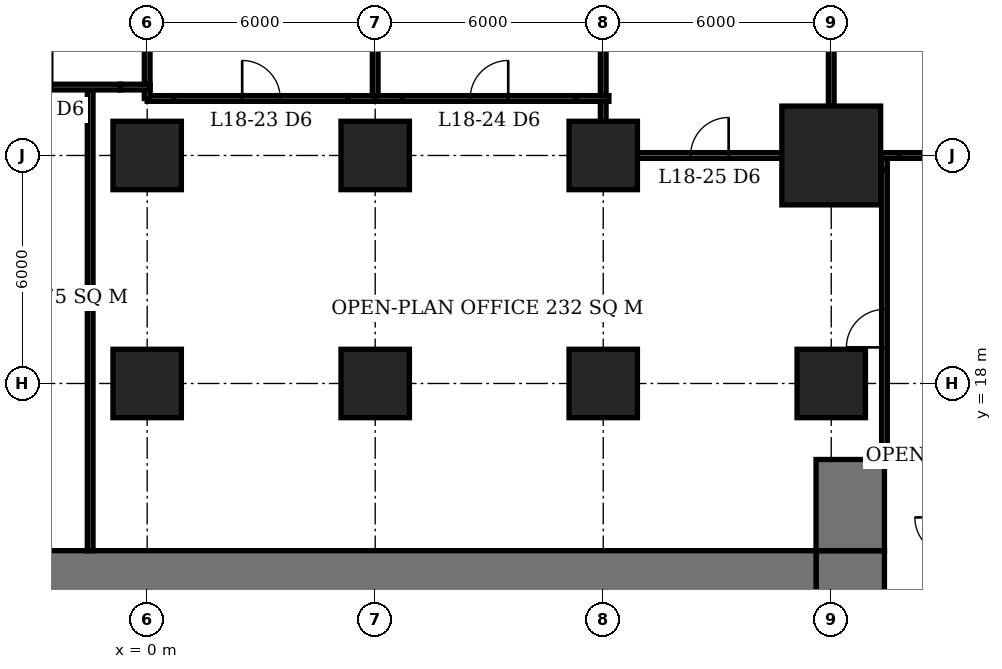
"""IFC4 building model, lengths in metres.
Left out: names, types, materials, properties, quantities, classifications, styles, units other than length and angle.
Written with IfcOpenShell. Run it as: python <this file> out.ifc"""

import sys

from ifc_helpers import new_model, si_unit, direction, frame, frame_2d, origin, origin_2d, place, context, subcontext, project, spatial, rectangle, extrude, element, fill, save


model = new_model("IFC4")
c1 = context("Model", 3, precision=1e-05, world=origin(), true_north=direction((0.0, 1.0)))
c2 = subcontext(c1, "Body", "Model", "MODEL_VIEW")
j1 = project(units=[si_unit("LENGTHUNIT", "METRE"), si_unit("PLANEANGLEUNIT", "RADIAN")], contexts=[c1])
p1 = place(None, origin())
s1 = spatial("IfcSite", under=j1, at=p1, CompositionType="ELEMENT")
p2 = place(p1, origin())
s2 = spatial("IfcBuilding", under=s1, at=p2, CompositionType="ELEMENT")
p3 = place(p2, frame((0.0, 0.0, 76.7)))
s3 = spatial("IfcBuildingStorey", under=s2, at=p3, CompositionType="ELEMENT", Elevation=76.7)
for number, where, z_axis, x_axis in (
    (1, (0.0, 18.0, 0.0), (0.0, 0.0, 1.0), (1.0, 0.0, 0.0)),
    (2, (0.0, 24.0, 0.0), (0.0, 0.0, 1.0), (1.0, 0.0, 0.0)),
    (3, (6.0, 18.0, 0.0), (0.0, 0.0, 1.0), (1.0, 0.0, 0.0)),
    (4, (6.0, 24.0, 0.0), (0.0, 0.0, 1.0), (1.0, 0.0, 0.0)),
    (5, (12.0, 18.0, 0.0), (0.0, 0.0, 1.0), (1.0, 0.0, 0.0)),
    (6, (12.0, 24.0, 0.0), (0.0, 0.0, 1.0), (1.0, 0.0, 0.0)),
    (7, (18.0, 18.0, 0.0), (0.0, 0.0, 1.0), (1.0, 0.0, 0.0)),
):
    element("IfcColumn", number, at=place(p3, frame(where, z_axis=z_axis, x_axis=x_axis)), inside=s3, PredefinedType="COLUMN", context=c2, shape_type="SweptSolid", body=[
        extrude(rectangle(XDim=1.8, YDim=1.8, at=origin_2d()), origin(), (0.0, 0.0, 1.0), 3.9),
    ])
p4 = place(p3, frame((18.0, 24.0, 0.0), z_axis=(0.0, 0.0, 1.0), x_axis=(1.0, 0.0, 0.0)))
e8 = element("IfcColumn", 8, at=p4, inside=s3, PredefinedType="COLUMN", context=c2, shape_type="SweptSolid", body=[
    extrude(rectangle(XDim=2.6, YDim=2.6, at=origin_2d()), origin(), (0.0, 0.0, 1.0), 3.9),
])
p5 = place(p3, frame((-5.6, 12.6, 0.0), z_axis=(0.0, 0.0, 1.0), x_axis=(1.0, 0.0, 0.0)))
e9 = element("IfcWall", 9, at=p5, inside=s3, PredefinedType="SHEAR", context=c2, shape_type="SweptSolid", body=[
    extrude(rectangle(XDim=23.2, YDim=2.0, at=frame_2d((11.6, 0.0))), origin(), (0.0, 0.0, 1.0), 3.9),
])
p6 = place(p3, frame((18.5, -7.6, 0.0), z_axis=(0.0, 0.0, 1.0), x_axis=(0.0, 1.0, 0.0)))
e10 = element("IfcWall", 10, at=p6, inside=s3, PredefinedType="SHEAR", context=c2, shape_type="SweptSolid", body=[
    extrude(rectangle(XDim=21.2, YDim=1.8, at=frame_2d((10.6, 0.0))), origin(), (0.0, 0.0, 1.0), 3.9),
])
p7 = place(p6, frame((9.2, 0.0, 0.0)))
e11 = element("IfcOpeningElement", 11, at=p7, cuts=e10, PredefinedType="OPENING", context=c2, shape_type="SweptSolid", body=[
    extrude(rectangle(XDim=1.8, YDim=2.4, at=frame_2d((0.9, 1.2))), frame((0.0, 0.91, 0.0), z_axis=(0.0, -1.0, 0.0), x_axis=(1.0, 0.0, 0.0)), (0.0, 0.0, 1.0), 1.82),
])
p8 = place(p3, frame((18.5, 13.6, 0.0), z_axis=(0.0, 0.0, 1.0), x_axis=(0.0, 1.0, 0.0)))
e12 = element("IfcWall", 12, at=p8, inside=s3, PredefinedType="SHEAR", context=c2, shape_type="SweptSolid", body=[
    extrude(rectangle(XDim=2.4, YDim=1.8, at=frame_2d((1.2, 0.0))), origin(), (0.0, 0.0, 1.0), 3.9),
])
p9 = place(p3, frame((12.9, 24.0, 0.0), z_axis=(0.0, 0.0, 1.0), x_axis=(1.0, 0.0, 0.0)))
e13 = element("IfcWall", 13, at=p9, inside=s3, PredefinedType="PARTITIONING", context=c2, shape_type="SweptSolid", body=[
    extrude(rectangle(XDim=3.8, YDim=0.15, at=frame_2d((1.9, 0.0))), origin(), (0.0, 0.0, 1.0), 3.65),
])
p10 = place(p9, frame((1.4, 0.0, 0.0)))
e14 = element("IfcOpeningElement", 14, at=p10, cuts=e13, PredefinedType="OPENING", context=c2, shape_type="SweptSolid", body=[
    extrude(rectangle(XDim=1.0, YDim=2.1, at=frame_2d((0.5, 1.05))), frame((0.0, 0.085, 0.0), z_axis=(0.0, -1.0, 0.0), x_axis=(1.0, 0.0, 0.0)), (0.0, 0.0, 1.0), 0.17),
])
p11 = place(p3, frame((19.3, 24.0, 0.0), z_axis=(0.0, 0.0, 1.0), x_axis=(1.0, 0.0, 0.0)))
e15 = element("IfcWall", 15, at=p11, inside=s3, PredefinedType="PARTITIONING", context=c2, shape_type="SweptSolid", body=[
    extrude(rectangle(XDim=0.492, YDim=0.15, at=frame_2d((0.246, 0.0))), origin(), (0.0, 0.0, 1.0), 2.65),
])
p12 = place(p3, frame((19.792, 24.0, 0.0), z_axis=(0.0, 0.0, 1.0), x_axis=(1.0, 0.0, 0.0)))
e16 = element("IfcWall", 16, at=p12, inside=s3, PredefinedType="PARTITIONING", context=c2, shape_type="SweptSolid", body=[
    extrude(rectangle(XDim=4.133, YDim=0.15, at=frame_2d((2.066, 0.0))), origin(), (0.0, 0.0, 1.0), 3.65),
])
p13 = place(p12, frame((1.604, 0.0, 0.0)))
e17 = element("IfcOpeningElement", 17, at=p13, cuts=e16, PredefinedType="OPENING", context=c2, shape_type="SweptSolid", body=[
    extrude(rectangle(XDim=1.0, YDim=2.1, at=frame_2d((0.5, 1.05))), frame((0.0, 0.085, 0.0), z_axis=(0.0, -1.0, 0.0), x_axis=(1.0, 0.0, 0.0)), (0.0, 0.0, 1.0), 0.17),
])
p14 = place(p3, frame((0.0, 25.5, 0.0), z_axis=(0.0, 0.0, 1.0), x_axis=(1.0, 0.0, 0.0)))
e18 = element("IfcWall", 18, at=p14, inside=s3, PredefinedType="PARTITIONING", context=c2, shape_type="SweptSolid", body=[
    extrude(rectangle(XDim=0.71, YDim=0.15, at=frame_2d((0.355, 0.0))), origin(), (0.0, 0.0, 1.0), 2.65),
])
p15 = place(p3, frame((0.71, 25.5, 0.0), z_axis=(0.0, 0.0, 1.0), x_axis=(1.0, 0.0, 0.0)))
e19 = element("IfcWall", 19, at=p15, inside=s3, PredefinedType="PARTITIONING", context=c2, shape_type="SweptSolid", body=[
    extrude(rectangle(XDim=4.58, YDim=0.15, at=frame_2d((2.29, 0.0))), origin(), (0.0, 0.0, 1.0), 3.65),
])
p16 = place(p15, frame((1.79, 0.0, 0.0)))
e20 = element("IfcOpeningElement", 20, at=p16, cuts=e19, PredefinedType="OPENING", context=c2, shape_type="SweptSolid", body=[
    extrude(rectangle(XDim=1.0, YDim=2.1, at=frame_2d((0.5, 1.05))), frame((0.0, 0.085, 0.0), z_axis=(0.0, -1.0, 0.0), x_axis=(1.0, 0.0, 0.0)), (0.0, 0.0, 1.0), 0.17),
])
p17 = place(p3, frame((5.29, 25.5, 0.0), z_axis=(0.0, 0.0, 1.0), x_axis=(1.0, 0.0, 0.0)))
e21 = element("IfcWall", 21, at=p17, inside=s3, PredefinedType="PARTITIONING", context=c2, shape_type="SweptSolid", body=[
    extrude(rectangle(XDim=0.785, YDim=0.15, at=frame_2d((0.393, 0.0))), origin(), (0.0, 0.0, 1.0), 2.65),
])
p18 = place(p3, frame((6.0, 25.5, 0.0), z_axis=(0.0, 0.0, 1.0), x_axis=(1.0, 0.0, 0.0)))
e22 = element("IfcWall", 22, at=p18, inside=s3, PredefinedType="PARTITIONING", context=c2, shape_type="SweptSolid", body=[
    extrude(rectangle(XDim=0.71, YDim=0.15, at=frame_2d((0.355, 0.0))), origin(), (0.0, 0.0, 1.0), 2.65),
])
p19 = place(p3, frame((6.71, 25.5, 0.0), z_axis=(0.0, 0.0, 1.0), x_axis=(1.0, 0.0, 0.0)))
e23 = element("IfcWall", 23, at=p19, inside=s3, PredefinedType="PARTITIONING", context=c2, shape_type="SweptSolid", body=[
    extrude(rectangle(XDim=4.58, YDim=0.15, at=frame_2d((2.29, 0.0))), origin(), (0.0, 0.0, 1.0), 3.65),
])
p20 = place(p19, frame((1.79, 0.0, 0.0)))
e24 = element("IfcOpeningElement", 24, at=p20, cuts=e23, PredefinedType="OPENING", context=c2, shape_type="SweptSolid", body=[
    extrude(rectangle(XDim=1.0, YDim=2.1, at=frame_2d((0.5, 1.05))), frame((0.0, 0.085, 0.0), z_axis=(0.0, -1.0, 0.0), x_axis=(1.0, 0.0, 0.0)), (0.0, 0.0, 1.0), 0.17),
])
p21 = place(p3, frame((11.29, 25.5, 0.0), z_axis=(0.0, 0.0, 1.0), x_axis=(1.0, 0.0, 0.0)))
e25 = element("IfcWall", 25, at=p21, inside=s3, PredefinedType="PARTITIONING", context=c2, shape_type="SweptSolid", body=[
    extrude(rectangle(XDim=0.86, YDim=0.15, at=frame_2d((0.43, 0.0))), origin(), (0.0, 0.0, 1.0), 2.65),
])
p22 = place(p3, frame((-5.29, 25.8, 0.0), z_axis=(0.0, 0.0, 1.0), x_axis=(1.0, 0.0, 0.0)))
e26 = element("IfcWall", 26, at=p22, inside=s3, PredefinedType="PARTITIONING", context=c2, shape_type="SweptSolid", body=[
    extrude(rectangle(XDim=4.58, YDim=0.15, at=frame_2d((2.29, 0.0))), origin(), (0.0, 0.0, 1.0), 3.65),
])
p23 = place(p22, frame((1.79, 0.0, 0.0)))
e27 = element("IfcOpeningElement", 27, at=p23, cuts=e26, PredefinedType="OPENING", context=c2, shape_type="SweptSolid", body=[
    extrude(rectangle(XDim=1.0, YDim=2.1, at=frame_2d((0.5, 1.05))), frame((0.0, 0.085, 0.0), z_axis=(0.0, -1.0, 0.0), x_axis=(1.0, 0.0, 0.0)), (0.0, 0.0, 1.0), 0.17),
])
p24 = place(p3, frame((-0.71, 25.8, 0.0), z_axis=(0.0, 0.0, 1.0), x_axis=(1.0, 0.0, 0.0)))
e28 = element("IfcWall", 28, at=p24, inside=s3, PredefinedType="PARTITIONING", context=c2, shape_type="SweptSolid", body=[
    extrude(rectangle(XDim=0.785, YDim=0.15, at=frame_2d((0.393, 0.0))), origin(), (0.0, 0.0, 1.0), 2.65),
])
p25 = place(p3, frame((0.0, 25.5, 0.0), z_axis=(0.0, 0.0, 1.0), x_axis=(0.0, 1.0, 0.0)))
e29 = element("IfcWall", 29, at=p25, inside=s3, PredefinedType="PARTITIONING", context=c2, shape_type="SweptSolid", body=[
    extrude(rectangle(XDim=0.3, YDim=0.15, at=frame_2d((0.15, 0.0))), origin(), (0.0, 0.0, 1.0), 2.65),
])
p26 = place(p3, frame((0.0, 25.875, 0.0), z_axis=(0.0, 0.0, 1.0), x_axis=(0.0, 1.0, 0.0)))
e30 = element("IfcWall", 30, at=p26, inside=s3, PredefinedType="PARTITIONING", context=c2, shape_type="SweptSolid", body=[
    extrude(rectangle(XDim=2.435, YDim=0.15, at=frame_2d((1.218, 0.0))), origin(), (0.0, 0.0, 1.0), 2.65),
])
p27 = place(p3, frame((6.0, 25.575, 0.0), z_axis=(0.0, 0.0, 1.0), x_axis=(0.0, 1.0, 0.0)))
e31 = element("IfcWall", 31, at=p27, inside=s3, PredefinedType="PARTITIONING", context=c2, shape_type="SweptSolid", body=[
    extrude(rectangle(XDim=2.735, YDim=0.15, at=frame_2d((1.368, 0.0))), origin(), (0.0, 0.0, 1.0), 2.65),
])
p28 = place(p3, frame((12.0, 24.9, 0.0), z_axis=(0.0, 0.0, 1.0), x_axis=(0.0, 1.0, 0.0)))
e32 = element("IfcWall", 32, at=p28, inside=s3, PredefinedType="PARTITIONING", context=c2, shape_type="SweptSolid", body=[
    extrude(rectangle(XDim=0.525, YDim=0.15, at=frame_2d((0.263, 0.0))), origin(), (0.0, 0.0, 1.0), 2.65),
])
p29 = place(p3, frame((12.0, 25.575, 0.0), z_axis=(0.0, 0.0, 1.0), x_axis=(0.0, 1.0, 0.0)))
e33 = element("IfcWall", 33, at=p29, inside=s3, PredefinedType="PARTITIONING", context=c2, shape_type="SweptSolid", body=[
    extrude(rectangle(XDim=2.735, YDim=0.15, at=frame_2d((1.368, 0.0))), origin(), (0.0, 0.0, 1.0), 2.65),
])
p30 = place(p3, frame((18.0, 25.3, 0.0), z_axis=(0.0, 0.0, 1.0), x_axis=(0.0, 1.0, 0.0)))
e34 = element("IfcWall", 34, at=p30, inside=s3, PredefinedType="PARTITIONING", context=c2, shape_type="SweptSolid", body=[
    extrude(rectangle(XDim=3.01, YDim=0.15, at=frame_2d((1.505, 0.0))), origin(), (0.0, 0.0, 1.0), 2.65),
])
p31 = place(p3, frame((-1.5, 13.6, 0.0), z_axis=(0.0, 0.0, 1.0), x_axis=(0.0, 1.0, 0.0)))
e35 = element("IfcWall", 35, at=p31, inside=s3, PredefinedType="PARTITIONING", context=c2, shape_type="SweptSolid", body=[
    extrude(rectangle(XDim=12.125, YDim=0.15, at=frame_2d((6.062, 0.0))), origin(), (0.0, 0.0, 1.0), 3.65),
])
p32 = place(p3, frame((19.4, 16.0, 0.0), z_axis=(0.0, 0.0, 1.0), x_axis=(0.0, 1.0, 0.0)))
e36 = element("IfcWall", 36, at=p32, inside=s3, PredefinedType="PARTITIONING", context=c2, shape_type="SweptSolid", body=[
    extrude(rectangle(XDim=7.608, YDim=0.15, at=frame_2d((3.804, 0.0))), origin(), (0.0, 0.0, 1.0), 3.65),
])
p33 = place(p32, frame((2.95, 0.0, 0.0)))
e37 = element("IfcOpeningElement", 37, at=p33, cuts=e36, PredefinedType="OPENING", context=c2, shape_type="SweptSolid", body=[
    extrude(rectangle(XDim=1.0, YDim=2.1, at=frame_2d((0.5, 1.05))), frame((0.0, 0.085, 0.0), z_axis=(0.0, -1.0, 0.0), x_axis=(1.0, 0.0, 0.0)), (0.0, 0.0, 1.0), 0.17),
])
p34 = place(p3, frame((19.4, 23.608, 0.0), z_axis=(0.0, 0.0, 1.0), x_axis=(0.0, 1.0, 0.0)))
e38 = element("IfcWall", 38, at=p34, inside=s3, PredefinedType="PARTITIONING", context=c2, shape_type="SweptSolid", body=[
    extrude(rectangle(XDim=0.317, YDim=0.15, at=frame_2d((0.159, 0.0))), origin(), (0.0, 0.0, 1.0), 2.65),
])
p35 = place(p16, origin())
e39 = element("IfcDoor", 39, at=p35, inside=s3, OperationType="SINGLE_SWING_LEFT", PredefinedType="DOOR", context=c2, shape_type="SweptSolid", body=[
    extrude(rectangle(XDim=1.0, YDim=2.1, at=frame_2d((0.5, 1.05))), frame((0.0, 0.025, 0.0), z_axis=(0.0, -1.0, 0.0), x_axis=(1.0, 0.0, 0.0)), (0.0, 0.0, 1.0), 0.05),
])
fill(e20, e39)
p36 = place(p20, origin())
e40 = element("IfcDoor", 40, at=p36, inside=s3, OperationType="SINGLE_SWING_RIGHT", PredefinedType="DOOR", context=c2, shape_type="SweptSolid", body=[
    extrude(rectangle(XDim=1.0, YDim=2.1, at=frame_2d((0.5, 1.05))), frame((0.0, 0.025, 0.0), z_axis=(0.0, -1.0, 0.0), x_axis=(1.0, 0.0, 0.0)), (0.0, 0.0, 1.0), 0.05),
])
fill(e24, e40)
p37 = place(p10, origin())
e41 = element("IfcDoor", 41, at=p37, inside=s3, OperationType="SINGLE_SWING_RIGHT", PredefinedType="DOOR", context=c2, shape_type="SweptSolid", body=[
    extrude(rectangle(XDim=1.0, YDim=2.1, at=frame_2d((0.5, 1.05))), frame((0.0, 0.025, 0.0), z_axis=(0.0, -1.0, 0.0), x_axis=(1.0, 0.0, 0.0)), (0.0, 0.0, 1.0), 0.05),
])
fill(e14, e41)
p38 = place(p33, origin())
e42 = element("IfcDoor", 42, at=p38, inside=s3, OperationType="SINGLE_SWING_LEFT", PredefinedType="DOOR", context=c2, shape_type="SweptSolid", body=[
    extrude(rectangle(XDim=1.0, YDim=2.1, at=frame_2d((0.5, 1.05))), frame((0.0, 0.025, 0.0), z_axis=(0.0, -1.0, 0.0), x_axis=(1.0, 0.0, 0.0)), (0.0, 0.0, 1.0), 0.05),
])
fill(e37, e42)
save(model, sys.argv[1])
